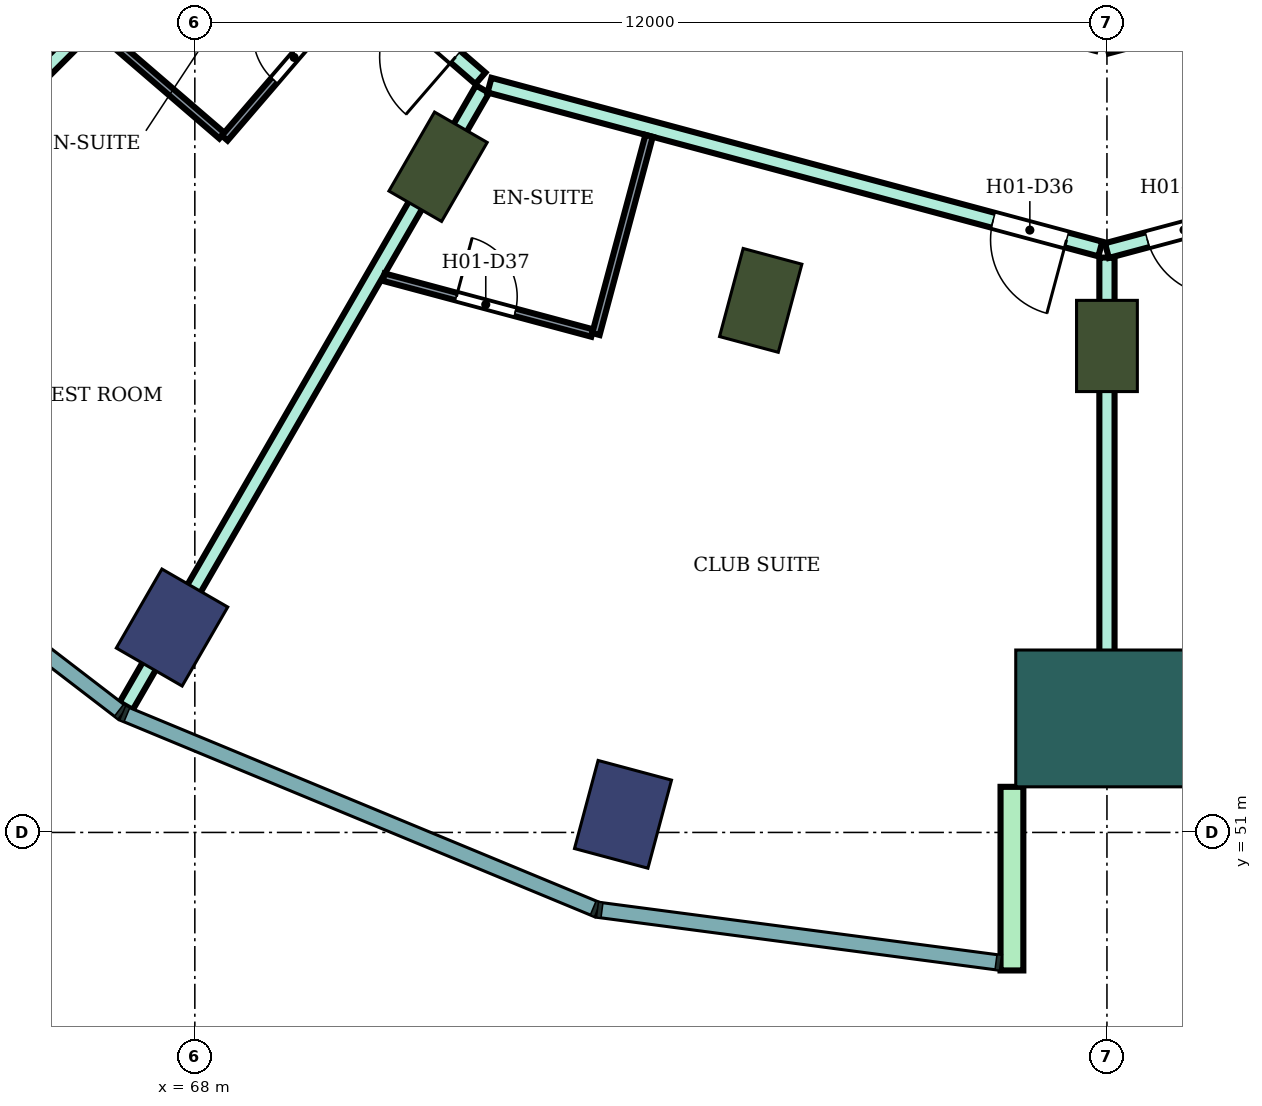
"""IFC4 building model, lengths in metres.
Left out: names, types, materials, properties, quantities, classifications, styles, units other than length and angle.
Written with IfcOpenShell. Run it as: python <this file> out.ifc"""

import sys

from ifc_helpers import new_model, si_unit, direction, frame, frame_2d, origin, origin_2d, place, context, subcontext, project, spatial, rectangle, extrude, element, fill, save


model = new_model("IFC4")
c1 = context("Model", 3, precision=1e-05, world=origin(), true_north=direction((0.0, 1.0)))
c2 = subcontext(c1, "Body", "Model", "MODEL_VIEW")
j1 = project(units=[si_unit("LENGTHUNIT", "METRE"), si_unit("PLANEANGLEUNIT", "RADIAN")], contexts=[c1])
p1 = place(None, origin())
s1 = spatial("IfcSite", under=j1, at=p1, CompositionType="ELEMENT")
p2 = place(p1, origin())
s2 = spatial("IfcBuilding", under=s1, at=p2, CompositionType="ELEMENT")
p3 = place(p2, frame((0.0, 0.0, 36.4)))
s3 = spatial("IfcBuildingStorey", under=s2, at=p3, CompositionType="ELEMENT", Elevation=36.4)
for number, where, z_axis, x_axis in (
    (1, (67.7, 53.696, 0.0), (0.0, 0.0, 1.0), (-0.5, -0.866, 0.0)),
    (2, (73.633, 51.238, 0.0), (0.0, 0.0, 1.0), (-0.259, -0.966, 0.0)),
):
    element("IfcColumn", number, at=place(p3, frame(where, z_axis=z_axis, x_axis=x_axis)), inside=s3, PredefinedType="COLUMN", context=c2, shape_type="SweptSolid", body=[
        extrude(rectangle(XDim=1.2, YDim=1.0, at=origin_2d()), origin(), (0.0, 0.0, 1.0), 3.8),
    ])
for number, where, z_axis, x_axis in (
    (3, (71.2, 59.758, 0.0), (0.0, 0.0, 1.0), (-0.5, -0.866, 0.0)),
    (4, (75.445, 58.0, 0.0), (0.0, 0.0, 1.0), (-0.259, -0.966, 0.0)),
    (5, (80.0, 57.4, 0.0), (0.0, 0.0, 1.0), (0.0, -1.0, 0.0)),
):
    element("IfcColumn", number, at=place(p3, frame(where, z_axis=z_axis, x_axis=x_axis)), inside=s3, PredefinedType="COLUMN", context=c2, shape_type="SweptSolid", body=[
        extrude(rectangle(XDim=1.2, YDim=0.8, at=origin_2d()), origin(), (0.0, 0.0, 1.0), 3.8),
    ])
p4 = place(p3, frame((80.0, 52.5, 0.0), z_axis=(0.0, 0.0, 1.0), x_axis=(0.0, -1.0, 0.0)))
e6 = element("IfcColumn", 6, at=p4, inside=s3, PredefinedType="COLUMN", context=c2, shape_type="SweptSolid", body=[
    extrude(rectangle(XDim=1.8, YDim=2.4, at=origin_2d()), origin(), (0.0, 0.0, 1.0), 3.8),
])
p5 = place(p3, frame((78.75, 51.6, 0.0), z_axis=(0.0, 0.0, 1.0), x_axis=(0.0, -1.0, 0.0)))
e7 = element("IfcWall", 7, at=p5, inside=s3, PredefinedType="NOTDEFINED", context=c2, shape_type="SweptSolid", body=[
    extrude(rectangle(XDim=2.416, YDim=0.3, at=frame_2d((1.208, 0.0))), origin(), (0.0, 0.0, 1.0), 3.8),
])
p6 = place(p3, frame((63.592, 58.599, 0.0), z_axis=(0.0, 0.0, 1.0), x_axis=(0.707228748718, 0.706984792613, 0.0)))
e8 = element("IfcWall", 8, at=p6, inside=s3, PredefinedType="PARTITIONING", context=c2, shape_type="SweptSolid", body=[
    extrude(rectangle(XDim=7.005, YDim=0.2, at=frame_2d((3.503, 0.0))), origin(), (0.0, 0.0, 1.0), 3.35),
])
p7 = place(p3, frame((67.078, 64.968, 0.0), z_axis=(0.0, 0.0, 1.0), x_axis=(0.756371089567, -0.654142778656, 0.0)))
e9 = element("IfcWall", 9, at=p7, inside=s3, PredefinedType="PARTITIONING", context=c2, shape_type="SweptSolid", body=[
    extrude(rectangle(XDim=6.185, YDim=0.2, at=frame_2d((3.093, 0.0))), origin(), (0.0, 0.0, 1.0), 3.35),
])
p8 = place(p7, frame((4.755, 0.0, 0.0)))
e10 = element("IfcOpeningElement", 10, at=p8, cuts=e9, PredefinedType="OPENING", context=c2, shape_type="SweptSolid", body=[
    extrude(rectangle(XDim=1.0, YDim=2.1, at=frame_2d((0.5, 1.05))), frame((0.0, 0.11, 0.0), z_axis=(0.0, -1.0, 0.0), x_axis=(1.0, 0.0, 0.0)), (0.0, 0.0, 1.0), 0.22),
])
p9 = place(p3, frame((67.096, 52.662, 0.0), z_axis=(0.0, 0.0, 1.0), x_axis=(0.500242450002, 0.865885379953, 0.0)))
e11 = element("IfcWall", 11, at=p9, inside=s3, PredefinedType="PARTITIONING", context=c2, shape_type="SweptSolid", body=[
    extrude(rectangle(XDim=9.374, YDim=0.2, at=frame_2d((4.687, 0.0))), origin(), (0.0, 0.0, 1.0), 3.35),
])
p10 = place(p3, frame((71.877, 60.831, 0.0), z_axis=(0.0, 0.0, 1.0), x_axis=(0.965852509869, -0.259092510851, 0.0)))
e12 = element("IfcWall", 12, at=p10, inside=s3, PredefinedType="PARTITIONING", context=c2, shape_type="SweptSolid", body=[
    extrude(rectangle(XDim=8.32, YDim=0.2, at=frame_2d((4.16, 0.0))), origin(), (0.0, 0.0, 1.0), 3.35),
])
p11 = place(p10, frame((6.86, 0.0, 0.0)))
e13 = element("IfcOpeningElement", 13, at=p11, cuts=e12, PredefinedType="OPENING", context=c2, shape_type="SweptSolid", body=[
    extrude(rectangle(XDim=1.0, YDim=2.1, at=frame_2d((0.5, 1.05))), frame((0.0, 0.11, 0.0), z_axis=(0.0, -1.0, 0.0), x_axis=(1.0, 0.0, 0.0)), (0.0, 0.0, 1.0), 0.22),
])
p12 = place(p3, frame((80.0, 51.801, 0.0), z_axis=(0.0, 0.0, 1.0), x_axis=(0.0, 1.0, 0.0)))
e14 = element("IfcWall", 14, at=p12, inside=s3, PredefinedType="PARTITIONING", context=c2, shape_type="SweptSolid", body=[
    extrude(rectangle(XDim=6.762, YDim=0.2, at=frame_2d((3.381, 0.0))), origin(), (0.0, 0.0, 1.0), 3.35),
])
p13 = place(p3, frame((80.0, 58.655, 0.0), z_axis=(0.0, 0.0, 1.0), x_axis=(0.965974635626, 0.258636817424, 0.0)))
e15 = element("IfcWall", 15, at=p13, inside=s3, PredefinedType="PARTITIONING", context=c2, shape_type="SweptSolid", body=[
    extrude(rectangle(XDim=8.36, YDim=0.2, at=frame_2d((4.18, 0.0))), origin(), (0.0, 0.0, 1.0), 3.35),
])
p14 = place(p13, frame((6.86, 0.0, 0.0)))
e16 = element("IfcOpeningElement", 16, at=p14, cuts=e15, PredefinedType="OPENING", context=c2, shape_type="SweptSolid", body=[
    extrude(rectangle(XDim=1.0, YDim=2.1, at=frame_2d((0.5, 1.05))), frame((0.0, 0.11, 0.0), z_axis=(0.0, -1.0, 0.0), x_axis=(1.0, 0.0, 0.0)), (0.0, 0.0, 1.0), 0.22),
])
p15 = place(p13, frame((0.55, 0.0, 0.0)))
e17 = element("IfcOpeningElement", 17, at=p15, cuts=e15, PredefinedType="OPENING", context=c2, shape_type="SweptSolid", body=[
    extrude(rectangle(XDim=1.0, YDim=2.1, at=frame_2d((0.5, 1.05))), frame((0.0, 0.11, 0.0), z_axis=(0.0, -1.0, 0.0), x_axis=(1.0, 0.0, 0.0)), (0.0, 0.0, 1.0), 0.22),
])
p16 = place(p3, frame((80.0, 61.346, 0.0), z_axis=(0.0, 0.0, 1.0), x_axis=(0.965924181808, 0.258825182312, 0.0)))
e18 = element("IfcWall", 18, at=p16, inside=s3, PredefinedType="PARTITIONING", context=c2, shape_type="SweptSolid", body=[
    extrude(rectangle(XDim=6.94, YDim=0.2, at=frame_2d((3.47, 0.0))), origin(), (0.0, 0.0, 1.0), 3.35),
])
p17 = place(p16, frame((0.55, 0.0, 0.0)))
e19 = element("IfcOpeningElement", 19, at=p17, cuts=e18, PredefinedType="OPENING", context=c2, shape_type="SweptSolid", body=[
    extrude(rectangle(XDim=1.0, YDim=2.1, at=frame_2d((0.5, 1.05))), frame((0.0, 0.11, 0.0), z_axis=(0.0, -1.0, 0.0), x_axis=(1.0, 0.0, 0.0)), (0.0, 0.0, 1.0), 0.22),
])
p18 = place(p3, frame((65.209, 62.875, 0.0), z_axis=(0.0, 0.0, 1.0), x_axis=(0.757930378138, -0.652335451969, 0.0)))
e20 = element("IfcWall", 20, at=p18, inside=s3, PredefinedType="PARTITIONING", context=c2, shape_type="SweptSolid", body=[
    extrude(rectangle(XDim=4.15, YDim=0.1, at=frame_2d((2.075, 0.0))), origin(), (0.0, 0.0, 1.0), 3.35),
])
p19 = place(p3, frame((68.393, 60.135, 0.0), z_axis=(0.0, 0.0, 1.0), x_axis=(0.652061182569, 0.758166349944, 0.0)))
e21 = element("IfcWall", 21, at=p19, inside=s3, PredefinedType="PARTITIONING", context=c2, shape_type="SweptSolid", body=[
    extrude(rectangle(XDim=2.69, YDim=0.1, at=frame_2d((1.345, 0.0))), origin(), (0.0, 0.0, 1.0), 3.35),
])
p20 = place(p19, frame((1.0, 0.0, 0.0)))
e22 = element("IfcOpeningElement", 22, at=p20, cuts=e21, PredefinedType="OPENING", context=c2, shape_type="SweptSolid", body=[
    extrude(rectangle(XDim=0.8, YDim=2.1, at=frame_2d((0.4, 1.05))), frame((0.0, 0.06, 0.0), z_axis=(0.0, -1.0, 0.0), x_axis=(1.0, 0.0, 0.0)), (0.0, 0.0, 1.0), 0.12),
])
p21 = place(p3, frame((70.484, 58.305, 0.0), z_axis=(0.0, 0.0, 1.0), x_axis=(0.965904703781, -0.258897862512, 0.0)))
e23 = element("IfcWall", 23, at=p21, inside=s3, PredefinedType="PARTITIONING", context=c2, shape_type="SweptSolid", body=[
    extrude(rectangle(XDim=2.841, YDim=0.1, at=frame_2d((1.421, 0.0))), origin(), (0.0, 0.0, 1.0), 3.35),
])
p22 = place(p21, frame((0.99, 0.0, 0.0)))
e24 = element("IfcOpeningElement", 24, at=p22, cuts=e23, PredefinedType="OPENING", context=c2, shape_type="SweptSolid", body=[
    extrude(rectangle(XDim=0.8, YDim=2.1, at=frame_2d((0.4, 1.05))), frame((0.0, 0.06, 0.0), z_axis=(0.0, -1.0, 0.0), x_axis=(1.0, 0.0, 0.0)), (0.0, 0.0, 1.0), 0.12),
])
p23 = place(p3, frame((73.277, 57.557, 0.0), z_axis=(0.0, 0.0, 1.0), x_axis=(0.258928960762, 0.965896367774, 0.0)))
e25 = element("IfcWall", 25, at=p23, inside=s3, PredefinedType="PARTITIONING", context=c2, shape_type="SweptSolid", body=[
    extrude(rectangle(XDim=2.699, YDim=0.1, at=frame_2d((1.35, 0.0))), origin(), (0.0, 0.0, 1.0), 3.35),
])
p24 = place(p15, frame((1.0, 0.0, 0.0), z_axis=(0.0, 0.0, 1.0), x_axis=(-1.0, 0.0, 0.0)))
e26 = element("IfcDoor", 26, at=p24, inside=s3, OperationType="SINGLE_SWING_LEFT", PredefinedType="DOOR", context=c2, shape_type="SweptSolid", body=[
    extrude(rectangle(XDim=1.0, YDim=2.1, at=frame_2d((0.5, 1.05))), frame((0.0, 0.025, 0.0), z_axis=(0.0, -1.0, 0.0), x_axis=(1.0, 0.0, 0.0)), (0.0, 0.0, 1.0), 0.05),
])
fill(e17, e26)
p25 = place(p11, frame((1.0, 0.0, 0.0), z_axis=(0.0, 0.0, 1.0), x_axis=(-1.0, 0.0, 0.0)))
e27 = element("IfcDoor", 27, at=p25, inside=s3, OperationType="SINGLE_SWING_LEFT", PredefinedType="DOOR", context=c2, shape_type="SweptSolid", body=[
    extrude(rectangle(XDim=1.0, YDim=2.1, at=frame_2d((0.5, 1.05))), frame((0.0, 0.025, 0.0), z_axis=(0.0, -1.0, 0.0), x_axis=(1.0, 0.0, 0.0)), (0.0, 0.0, 1.0), 0.05),
])
fill(e13, e27)
p26 = place(p22, origin())
e28 = element("IfcDoor", 28, at=p26, inside=s3, OperationType="SINGLE_SWING_LEFT", PredefinedType="DOOR", context=c2, shape_type="SweptSolid", body=[
    extrude(rectangle(XDim=0.8, YDim=2.1, at=frame_2d((0.4, 1.05))), frame((0.0, 0.025, 0.0), z_axis=(0.0, -1.0, 0.0), x_axis=(1.0, 0.0, 0.0)), (0.0, 0.0, 1.0), 0.05),
])
fill(e24, e28)
p27 = place(p8, frame((1.0, 0.0, 0.0), z_axis=(0.0, 0.0, 1.0), x_axis=(-1.0, 0.0, 0.0)))
e29 = element("IfcDoor", 29, at=p27, inside=s3, OperationType="SINGLE_SWING_LEFT", PredefinedType="DOOR", context=c2, shape_type="SweptSolid", body=[
    extrude(rectangle(XDim=1.0, YDim=2.1, at=frame_2d((0.5, 1.05))), frame((0.0, 0.025, 0.0), z_axis=(0.0, -1.0, 0.0), x_axis=(1.0, 0.0, 0.0)), (0.0, 0.0, 1.0), 0.05),
])
fill(e10, e29)
p28 = place(p20, origin())
e30 = element("IfcDoor", 30, at=p28, inside=s3, OperationType="SINGLE_SWING_RIGHT", PredefinedType="DOOR", context=c2, shape_type="SweptSolid", body=[
    extrude(rectangle(XDim=0.8, YDim=2.1, at=frame_2d((0.4, 1.05))), frame((0.0, 0.025, 0.0), z_axis=(0.0, -1.0, 0.0), x_axis=(1.0, 0.0, 0.0)), (0.0, 0.0, 1.0), 0.05),
])
fill(e22, e30)
save(model, sys.argv[1])
